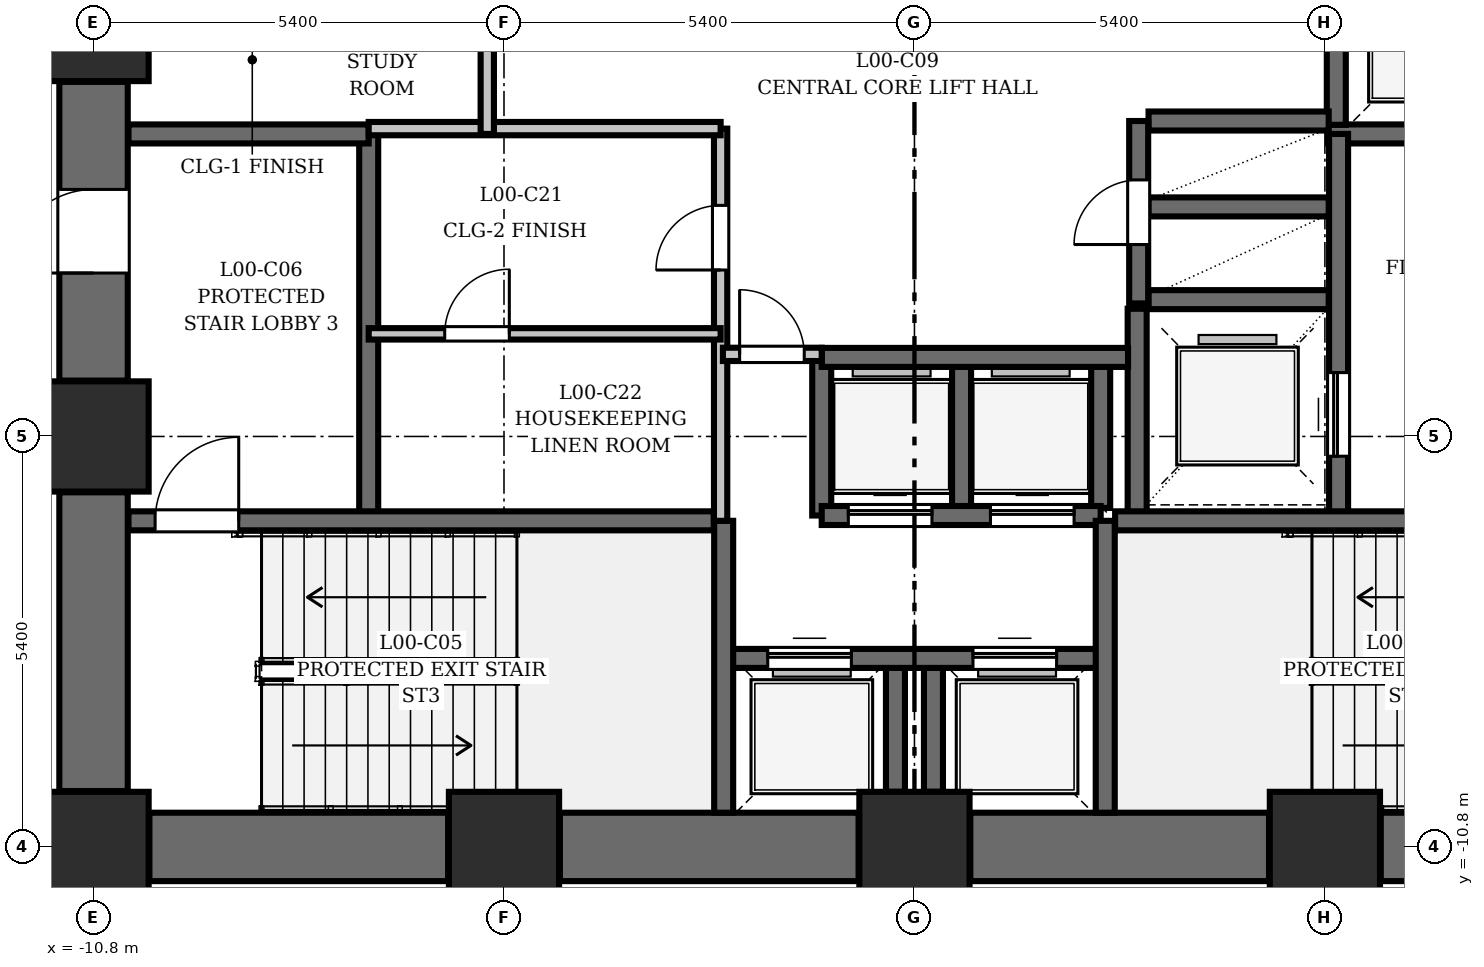
"""IFC4 building model, lengths in metres.
Left out: names, types, materials, properties, quantities, classifications, styles, units other than length and angle.
Written with IfcOpenShell. Run it as: python <this file> out.ifc"""

import sys

from ifc_helpers import new_model, si_unit, direction, frame, frame_2d, origin, origin_2d, place, context, subcontext, project, spatial, rectangle, extrude, element, fill, save


model = new_model("IFC4")
c1 = context("Model", 3, precision=1e-05, world=origin(), true_north=direction((0.0, 1.0)))
c2 = subcontext(c1, "Body", "Model", "MODEL_VIEW")
j1 = project(units=[si_unit("LENGTHUNIT", "METRE"), si_unit("PLANEANGLEUNIT", "RADIAN")], contexts=[c1])
p1 = place(None, origin())
s1 = spatial("IfcSite", under=j1, at=p1, CompositionType="ELEMENT")
p2 = place(p1, origin())
s2 = spatial("IfcBuilding", under=s1, at=p2, CompositionType="ELEMENT")
p3 = place(p2, origin())
s3 = spatial("IfcBuildingStorey", under=s2, at=p3, CompositionType="ELEMENT", Elevation=0.0)
for number, where, z_axis, x_axis in (
    (1, (-10.8, -10.8, 0.0), (0.0, 0.0, 1.0), (1.0, 0.0, 0.0)),
    (2, (-10.8, -5.4, 0.0), (0.0, 0.0, 1.0), (1.0, 0.0, 0.0)),
    (3, (-10.8, 0.0, 0.0), (0.0, 0.0, 1.0), (1.0, 0.0, 0.0)),
    (4, (-5.4, -10.8, 0.0), (0.0, 0.0, 1.0), (1.0, 0.0, 0.0)),
    (5, (0.0, -10.8, 0.0), (0.0, 0.0, 1.0), (1.0, 0.0, 0.0)),
    (6, (5.4, -10.8, 0.0), (0.0, 0.0, 1.0), (1.0, 0.0, 0.0)),
):
    element("IfcColumn", number, at=place(p3, frame(where, z_axis=z_axis, x_axis=x_axis)), inside=s3, PredefinedType="COLUMN", context=c2, shape_type="SweptSolid", body=[
        extrude(rectangle(XDim=1.45, YDim=1.45, at=origin_2d()), origin(), (0.0, 0.0, 1.0), 4.5),
    ])
for number, where, z_axis, x_axis in (
    (7, (-10.065, -10.8, 0.0), (0.0, 0.0, 1.0), (1.0, 0.0, 0.0)),
    (8, (-10.8, -10.065, 0.0), (0.0, 0.0, 1.0), (0.0, 1.0, 0.0)),
    (9, (-4.665, -10.8, 0.0), (0.0, 0.0, 1.0), (1.0, 0.0, 0.0)),
):
    element("IfcWall", number, at=place(p3, frame(where, z_axis=z_axis, x_axis=x_axis)), inside=s3, PredefinedType="SHEAR", context=c2, shape_type="SweptSolid", body=[
        extrude(rectangle(XDim=3.93, YDim=0.9, at=frame_2d((1.965, 0.0))), origin(), (0.0, 0.0, 1.0), 4.5),
    ])
p4 = place(p3, frame((-10.8, -4.665, 0.0), z_axis=(0.0, 0.0, 1.0), x_axis=(0.0, 1.0, 0.0)))
e10 = element("IfcWall", 10, at=p4, inside=s3, PredefinedType="SHEAR", context=c2, shape_type="SweptSolid", body=[
    extrude(rectangle(XDim=3.93, YDim=0.9, at=frame_2d((1.965, 0.0))), origin(), (0.0, 0.0, 1.0), 4.5),
])
p5 = place(p4, frame((1.415, 0.0, 0.0)))
e11 = element("IfcOpeningElement", 11, at=p5, cuts=e10, PredefinedType="OPENING", context=c2, shape_type="SweptSolid", body=[
    extrude(rectangle(XDim=1.1, YDim=2.1, at=frame_2d((0.55, 1.05))), frame((0.0, 0.46, 0.0), z_axis=(0.0, -1.0, 0.0), x_axis=(1.0, 0.0, 0.0)), (0.0, 0.0, 1.0), 0.92),
])
for number, where, z_axis, x_axis in (
    (12, (0.735, -10.8, 0.0), (0.0, 0.0, 1.0), (1.0, 0.0, 0.0)),
    (13, (6.135, -10.8, 0.0), (0.0, 0.0, 1.0), (1.0, 0.0, 0.0)),
):
    element("IfcWall", number, at=place(p3, frame(where, z_axis=z_axis, x_axis=x_axis)), inside=s3, PredefinedType="SHEAR", context=c2, shape_type="SweptSolid", body=[
        extrude(rectangle(XDim=3.93, YDim=0.9, at=frame_2d((1.965, 0.0))), origin(), (0.0, 0.0, 1.0), 4.5),
    ])
p6 = place(p3, frame((2.93, -6.51, 0.0), z_axis=(0.0, 0.0, 1.0), x_axis=(0.0, 1.0, 0.0)))
e14 = element("IfcWall", 14, at=p6, inside=s3, PredefinedType="SHEAR", context=c2, shape_type="SweptSolid", body=[
    extrude(rectangle(XDim=2.79, YDim=0.25, at=frame_2d((1.395, 0.0))), origin(), (0.0, 0.0, 1.0), 4.5),
])
p7 = place(p3, frame((5.44, -1.42, 0.0), z_axis=(0.0, 0.0, 1.0), x_axis=(1.0, 0.0, 0.0)))
e15 = element("IfcWall", 15, at=p7, inside=s3, PredefinedType="SHEAR", context=c2, shape_type="SweptSolid", body=[
    extrude(rectangle(XDim=4.9, YDim=0.25, at=frame_2d((2.45, 0.0))), origin(), (0.0, 0.0, 1.0), 4.5),
])
p8 = place(p3, frame((3.08, -3.6, 0.0), z_axis=(0.0, 0.0, 1.0), x_axis=(1.0, 0.0, 0.0)))
e16 = element("IfcWall", 16, at=p8, inside=s3, PredefinedType="SHEAR", context=c2, shape_type="SweptSolid", body=[
    extrude(rectangle(XDim=2.37, YDim=0.25, at=frame_2d((1.185, 0.0))), origin(), (0.0, 0.0, 1.0), 4.5),
])
p9 = place(p3, frame((5.58, -6.51, 0.0), z_axis=(0.0, 0.0, 1.0), x_axis=(0.0, 1.0, 0.0)))
e17 = element("IfcWall", 17, at=p9, inside=s3, PredefinedType="SHEAR", context=c2, shape_type="SweptSolid", body=[
    extrude(rectangle(XDim=5.09, YDim=0.25, at=frame_2d((2.545, 0.0))), origin(), (0.0, 0.0, 1.0), 4.5),
])
p10 = place(p9, frame((0.85, 0.0, 0.0)))
e18 = element("IfcOpeningElement", 18, at=p10, cuts=e17, PredefinedType="OPENING", context=c2, shape_type="SweptSolid", body=[
    extrude(rectangle(XDim=1.1, YDim=2.1, at=frame_2d((0.55, 1.05))), frame((0.0, 0.135, 0.0), z_axis=(0.0, -1.0, 0.0), x_axis=(1.0, 0.0, 0.0)), (0.0, 0.0, 1.0), 0.27),
])
for number, where, z_axis, x_axis in (
    (19, (0.62, -6.34, 0.0), (0.0, 0.0, 1.0), (0.0, 1.0, 0.0)),
    (20, (2.45, -6.34, 0.0), (0.0, 0.0, 1.0), (0.0, 1.0, 0.0)),
):
    element("IfcWall", number, at=place(p3, frame(where, z_axis=z_axis, x_axis=x_axis)), inside=s3, PredefinedType="SHEAR", context=c2, shape_type="SweptSolid", body=[
        extrude(rectangle(XDim=1.88, YDim=0.25, at=frame_2d((0.94, 0.0))), origin(), (0.0, 0.0, 1.0), 4.5),
    ])
for number, where, z_axis, x_axis in (
    (21, (-0.25, -10.075, 0.0), (0.0, 0.0, 1.0), (0.0, 1.0, 0.0)),
    (22, (0.25, -10.075, 0.0), (0.0, 0.0, 1.0), (0.0, 1.0, 0.0)),
):
    element("IfcWall", number, at=place(p3, frame(where, z_axis=z_axis, x_axis=x_axis)), inside=s3, PredefinedType="SHEAR", context=c2, shape_type="SweptSolid", body=[
        extrude(rectangle(XDim=1.635, YDim=0.25, at=frame_2d((0.817, 0.0))), origin(), (0.0, 0.0, 1.0), 4.5),
    ])
p11 = place(p3, frame((-1.22, -6.44, 0.0), z_axis=(0.0, 0.0, 1.0), x_axis=(0.0, 1.0, 0.0)))
e23 = element("IfcWall", 23, at=p11, inside=s3, PredefinedType="SHEAR", context=c2, shape_type="SweptSolid", body=[
    extrude(rectangle(XDim=2.08, YDim=0.25, at=frame_2d((1.04, 0.0))), origin(), (0.0, 0.0, 1.0), 4.5),
])
p12 = place(p3, frame((-1.22, -6.44, 0.0), z_axis=(0.0, 0.0, 1.0), x_axis=(1.0, 0.0, 0.0)))
e24 = element("IfcWall", 24, at=p12, inside=s3, PredefinedType="SHEAR", context=c2, shape_type="SweptSolid", body=[
    extrude(rectangle(XDim=3.67, YDim=0.25, at=frame_2d((1.835, 0.0))), origin(), (0.0, 0.0, 1.0), 4.5),
])
p13 = place(p12, frame((0.35, 0.0, 0.0)))
e25 = element("IfcOpeningElement", 25, at=p13, cuts=e24, PredefinedType="OPENING", context=c2, shape_type="SweptSolid", body=[
    extrude(rectangle(XDim=1.1, YDim=2.1, at=frame_2d((0.55, 1.05))), frame((0.0, 0.135, 0.0), z_axis=(0.0, -1.0, 0.0), x_axis=(1.0, 0.0, 0.0)), (0.0, 0.0, 1.0), 0.27),
])
p14 = place(p12, frame((2.22, 0.0, 0.0)))
e26 = element("IfcOpeningElement", 26, at=p14, cuts=e24, PredefinedType="OPENING", context=c2, shape_type="SweptSolid", body=[
    extrude(rectangle(XDim=1.1, YDim=2.1, at=frame_2d((0.55, 1.05))), frame((0.0, 0.135, 0.0), z_axis=(0.0, -1.0, 0.0), x_axis=(1.0, 0.0, 0.0)), (0.0, 0.0, 1.0), 0.27),
])
p15 = place(p3, frame((-2.48, -8.32, 0.0), z_axis=(0.0, 0.0, 1.0), x_axis=(1.0, 0.0, 0.0)))
e27 = element("IfcWall", 27, at=p15, inside=s3, PredefinedType="SHEAR", context=c2, shape_type="SweptSolid", body=[
    extrude(rectangle(XDim=4.93, YDim=0.25, at=frame_2d((2.465, 0.0))), origin(), (0.0, 0.0, 1.0), 4.5),
])
p16 = place(p15, frame((0.55, 0.0, 0.0)))
e28 = element("IfcOpeningElement", 28, at=p16, cuts=e27, PredefinedType="OPENING", context=c2, shape_type="SweptSolid", body=[
    extrude(rectangle(XDim=1.1, YDim=2.1, at=frame_2d((0.55, 1.05))), frame((0.0, 0.135, 0.0), z_axis=(0.0, -1.0, 0.0), x_axis=(1.0, 0.0, 0.0)), (0.0, 0.0, 1.0), 0.27),
])
p17 = place(p15, frame((3.25, 0.0, 0.0)))
e29 = element("IfcOpeningElement", 29, at=p17, cuts=e27, PredefinedType="OPENING", context=c2, shape_type="SweptSolid", body=[
    extrude(rectangle(XDim=1.1, YDim=2.1, at=frame_2d((0.55, 1.05))), frame((0.0, 0.135, 0.0), z_axis=(0.0, -1.0, 0.0), x_axis=(1.0, 0.0, 0.0)), (0.0, 0.0, 1.0), 0.27),
])
p18 = place(p3, frame((-1.22, -4.36, 0.0), z_axis=(0.0, 0.0, 1.0), x_axis=(1.0, 0.0, 0.0)))
e30 = element("IfcWall", 30, at=p18, inside=s3, PredefinedType="SHEAR", context=c2, shape_type="SweptSolid", body=[
    extrude(rectangle(XDim=4.03, YDim=0.25, at=frame_2d((2.015, 0.0))), origin(), (0.0, 0.0, 1.0), 4.5),
])
p19 = place(p3, frame((5.55, -1.3, 0.0), z_axis=(0.0, 0.0, 1.0), x_axis=(0.0, 1.0, 0.0)))
e31 = element("IfcWall", 31, at=p19, inside=s3, PredefinedType="SHEAR", context=c2, shape_type="SweptSolid", body=[
    extrude(rectangle(XDim=2.04, YDim=0.25, at=frame_2d((1.02, 0.0))), origin(), (0.0, 0.0, 1.0), 4.5),
])
for number, where, z_axis, x_axis in (
    (32, (3.08, -2.38, 0.0), (0.0, 0.0, 1.0), (1.0, 0.0, 0.0)),
    (33, (3.08, -1.25, 0.0), (0.0, 0.0, 1.0), (1.0, 0.0, 0.0)),
):
    element("IfcWall", number, at=place(p3, frame(where, z_axis=z_axis, x_axis=x_axis)), inside=s3, PredefinedType="SHEAR", context=c2, shape_type="SweptSolid", body=[
        extrude(rectangle(XDim=2.37, YDim=0.25, at=frame_2d((1.185, 0.0))), origin(), (0.0, 0.0, 1.0), 4.5),
    ])
p20 = place(p3, frame((2.95, -3.65, 0.0), z_axis=(0.0, 0.0, 1.0), x_axis=(0.0, 1.0, 0.0)))
e34 = element("IfcWall", 34, at=p20, inside=s3, PredefinedType="SHEAR", context=c2, shape_type="SweptSolid", body=[
    extrude(rectangle(XDim=2.4, YDim=0.25, at=frame_2d((1.2, 0.0))), origin(), (0.0, 0.0, 1.0), 4.5),
])
p21 = place(p20, frame((0.775, 0.0, 0.0)))
e35 = element("IfcOpeningElement", 35, at=p21, cuts=e34, PredefinedType="OPENING", context=c2, shape_type="SweptSolid", body=[
    extrude(rectangle(XDim=0.85, YDim=2.1, at=frame_2d((0.425, 1.05))), frame((0.0, 0.135, 0.0), z_axis=(0.0, -1.0, 0.0), x_axis=(1.0, 0.0, 0.0)), (0.0, 0.0, 1.0), 0.27),
])
p22 = place(p3, frame((2.64, -6.51, 0.0), z_axis=(0.0, 0.0, 1.0), x_axis=(1.0, 0.0, 0.0)))
e36 = element("IfcWall", 36, at=p22, inside=s3, PredefinedType="SHEAR", context=c2, shape_type="SweptSolid", body=[
    extrude(rectangle(XDim=7.7, YDim=0.25, at=frame_2d((3.85, 0.0))), origin(), (0.0, 0.0, 1.0), 4.5),
])
p23 = place(p22, frame((6.0, 0.0, 0.0)))
e37 = element("IfcOpeningElement", 37, at=p23, cuts=e36, PredefinedType="OPENING", context=c2, shape_type="SweptSolid", body=[
    extrude(rectangle(XDim=0.95, YDim=2.1, at=frame_2d((0.475, 1.05))), frame((0.0, 0.135, 0.0), z_axis=(0.0, -1.0, 0.0), x_axis=(1.0, 0.0, 0.0)), (0.0, 0.0, 1.0), 0.27),
])
for number, where, z_axis, x_axis in (
    (38, (2.51, -10.35, 0.0), (0.0, 0.0, 1.0), (0.0, 1.0, 0.0)),
    (39, (-2.51, -10.35, 0.0), (0.0, 0.0, 1.0), (0.0, 1.0, 0.0)),
):
    element("IfcWall", number, at=place(p3, frame(where, z_axis=z_axis, x_axis=x_axis)), inside=s3, PredefinedType="SHEAR", context=c2, shape_type="SweptSolid", body=[
        extrude(rectangle(XDim=3.84, YDim=0.25, at=frame_2d((1.92, 0.0))), origin(), (0.0, 0.0, 1.0), 4.5),
    ])
p24 = place(p3, frame((-7.18, -6.51, 0.0), z_axis=(0.0, 0.0, 1.0), x_axis=(0.0, 1.0, 0.0)))
e40 = element("IfcWall", 40, at=p24, inside=s3, PredefinedType="SHEAR", context=c2, shape_type="SweptSolid", body=[
    extrude(rectangle(XDim=5.09, YDim=0.25, at=frame_2d((2.545, 0.0))), origin(), (0.0, 0.0, 1.0), 4.5),
])
p25 = place(p3, frame((-10.34, -1.42, 0.0), z_axis=(0.0, 0.0, 1.0), x_axis=(1.0, 0.0, 0.0)))
e41 = element("IfcWall", 41, at=p25, inside=s3, PredefinedType="SHEAR", context=c2, shape_type="SweptSolid", body=[
    extrude(rectangle(XDim=3.16, YDim=0.25, at=frame_2d((1.58, 0.0))), origin(), (0.0, 0.0, 1.0), 4.5),
])
p26 = place(p3, frame((-10.34, -6.51, 0.0), z_axis=(0.0, 0.0, 1.0), x_axis=(1.0, 0.0, 0.0)))
e42 = element("IfcWall", 42, at=p26, inside=s3, PredefinedType="SHEAR", context=c2, shape_type="SweptSolid", body=[
    extrude(rectangle(XDim=7.7, YDim=0.25, at=frame_2d((3.85, 0.0))), origin(), (0.0, 0.0, 1.0), 4.5),
])
p27 = place(p26, frame((0.35, 0.0, 0.0)))
e43 = element("IfcOpeningElement", 43, at=p27, cuts=e42, PredefinedType="OPENING", context=c2, shape_type="SweptSolid", body=[
    extrude(rectangle(XDim=1.1, YDim=2.1, at=frame_2d((0.55, 1.05))), frame((0.0, 0.135, 0.0), z_axis=(0.0, -1.0, 0.0), x_axis=(1.0, 0.0, 0.0)), (0.0, 0.0, 1.0), 0.27),
])
p28 = place(p3, frame((-2.55, -6.51, 0.0), z_axis=(0.0, 0.0, 1.0), x_axis=(0.0, 1.0, 0.0)))
e44 = element("IfcWall", 44, at=p28, inside=s3, PredefinedType="PARTITIONING", context=c2, shape_type="SweptSolid", body=[
    extrude(rectangle(XDim=5.16, YDim=0.175, at=frame_2d((2.58, 0.0))), origin(), (0.0, 0.0, 1.0), 4.2),
])
p29 = place(p28, frame((3.3, 0.0, 0.0)))
e45 = element("IfcOpeningElement", 45, at=p29, cuts=e44, PredefinedType="OPENING", context=c2, shape_type="SweptSolid", body=[
    extrude(rectangle(XDim=0.85, YDim=2.1, at=frame_2d((0.425, 1.05))), frame((0.0, 0.097, 0.0), z_axis=(0.0, -1.0, 0.0), x_axis=(1.0, 0.0, 0.0)), (0.0, 0.0, 1.0), 0.195),
])
p30 = place(p3, frame((-7.18, -4.05, 0.0), z_axis=(0.0, 0.0, 1.0), x_axis=(1.0, 0.0, 0.0)))
e46 = element("IfcWall", 46, at=p30, inside=s3, PredefinedType="PARTITIONING", context=c2, shape_type="SweptSolid", body=[
    extrude(rectangle(XDim=4.63, YDim=0.15, at=frame_2d((2.315, 0.0))), origin(), (0.0, 0.0, 1.0), 4.2),
])
p31 = place(p30, frame((1.0, 0.0, 0.0)))
e47 = element("IfcOpeningElement", 47, at=p31, cuts=e46, PredefinedType="OPENING", context=c2, shape_type="SweptSolid", body=[
    extrude(rectangle(XDim=0.85, YDim=2.1, at=frame_2d((0.425, 1.05))), frame((0.0, 0.085, 0.0), z_axis=(0.0, -1.0, 0.0), x_axis=(1.0, 0.0, 0.0)), (0.0, 0.0, 1.0), 0.17),
])
p32 = place(p3, frame((-7.18, -1.35, 0.0), z_axis=(0.0, 0.0, 1.0), x_axis=(1.0, 0.0, 0.0)))
e48 = element("IfcWall", 48, at=p32, inside=s3, PredefinedType="PARTITIONING", context=c2, shape_type="SweptSolid", body=[
    extrude(rectangle(XDim=4.63, YDim=0.175, at=frame_2d((2.315, 0.0))), origin(), (0.0, 0.0, 1.0), 4.2),
])
p33 = place(p3, frame((-5.62, -1.42, 0.0), z_axis=(0.0, 0.0, 1.0), x_axis=(0.0, 1.0, 0.0)))
e49 = element("IfcWall", 49, at=p33, inside=s3, PredefinedType="PARTITIONING", context=c2, shape_type="SweptSolid", body=[
    extrude(rectangle(XDim=2.14, YDim=0.175, at=frame_2d((1.07, 0.0))), origin(), (0.0, 0.0, 1.0), 4.2),
])
p34 = place(p3, frame((-2.52, -4.32, 0.0), z_axis=(0.0, 0.0, 1.0), x_axis=(1.0, 0.0, 0.0)))
e50 = element("IfcWall", 50, at=p34, inside=s3, PredefinedType="PARTITIONING", context=c2, shape_type="SweptSolid", body=[
    extrude(rectangle(XDim=1.3, YDim=0.175, at=frame_2d((0.65, 0.0))), origin(), (0.0, 0.0, 1.0), 4.2),
])
p35 = place(p34, frame((0.22, 0.0, 0.0)))
e51 = element("IfcOpeningElement", 51, at=p35, cuts=e50, PredefinedType="OPENING", context=c2, shape_type="SweptSolid", body=[
    extrude(rectangle(XDim=0.85, YDim=2.1, at=frame_2d((0.425, 1.05))), frame((0.0, 0.097, 0.0), z_axis=(0.0, -1.0, 0.0), x_axis=(1.0, 0.0, 0.0)), (0.0, 0.0, 1.0), 0.195),
])
p36 = place(p3, frame((-21.56, -5.9, 0.0), z_axis=(0.0, 0.0, 1.0), x_axis=(1.0, 0.0, 0.0)))
e52 = element("IfcWall", 52, at=p36, inside=s3, PredefinedType="PARTITIONING", context=c2, shape_type="SweptSolid", body=[
    extrude(rectangle(XDim=10.71, YDim=0.2, at=frame_2d((5.355, 0.0))), origin(), (0.0, 0.0, 1.0), 3.329),
])
p37 = place(p36, frame((7.36, 0.0, 0.0)))
e53 = element("IfcOpeningElement", 53, at=p37, cuts=e52, PredefinedType="OPENING", context=c2, shape_type="SweptSolid", body=[
    extrude(rectangle(XDim=1.1, YDim=2.1, at=frame_2d((0.55, 1.05))), frame((0.0, 0.11, 0.0), z_axis=(0.0, -1.0, 0.0), x_axis=(1.0, 0.0, 0.0)), (0.0, 0.0, 1.0), 0.22),
])
p38 = place(p27, origin())
e54 = element("IfcDoor", 54, at=p38, inside=s3, OperationType="SINGLE_SWING_RIGHT", PredefinedType="DOOR", context=c2, shape_type="SweptSolid", body=[
    extrude(rectangle(XDim=1.1, YDim=2.1, at=frame_2d((0.55, 1.05))), frame((0.0, 0.025, 0.0), z_axis=(0.0, -1.0, 0.0), x_axis=(1.0, 0.0, 0.0)), (0.0, 0.0, 1.0), 0.05),
])
fill(e43, e54)
p39 = place(p21, origin())
e55 = element("IfcDoor", 55, at=p39, inside=s3, OperationType="SINGLE_SWING_LEFT", PredefinedType="DOOR", context=c2, shape_type="SweptSolid", body=[
    extrude(rectangle(XDim=0.85, YDim=2.1, at=frame_2d((0.425, 1.05))), frame((0.0, 0.025, 0.0), z_axis=(0.0, -1.0, 0.0), x_axis=(1.0, 0.0, 0.0)), (0.0, 0.0, 1.0), 0.05),
])
fill(e35, e55)
p40 = place(p5, origin())
e56 = element("IfcDoor", 56, at=p40, inside=s3, OperationType="SINGLE_SWING_LEFT", PredefinedType="DOOR", context=c2, shape_type="SweptSolid", body=[
    extrude(rectangle(XDim=1.1, YDim=2.1, at=frame_2d((0.55, 1.05))), frame((0.0, 0.025, 0.0), z_axis=(0.0, -1.0, 0.0), x_axis=(1.0, 0.0, 0.0)), (0.0, 0.0, 1.0), 0.05),
])
fill(e11, e56)
p41 = place(p10, origin())
e57 = element("IfcDoor", 57, at=p41, inside=s3, OperationType="SLIDING_TO_RIGHT", PredefinedType="DOOR", context=c2, shape_type="SweptSolid", body=[
    extrude(rectangle(XDim=1.1, YDim=2.1, at=frame_2d((0.55, 1.05))), frame((0.0, 0.025, 0.0), z_axis=(0.0, -1.0, 0.0), x_axis=(1.0, 0.0, 0.0)), (0.0, 0.0, 1.0), 0.05),
])
fill(e18, e57)
p42 = place(p35, origin())
e58 = element("IfcDoor", 58, at=p42, inside=s3, OperationType="SINGLE_SWING_LEFT", PredefinedType="DOOR", context=c2, shape_type="SweptSolid", body=[
    extrude(rectangle(XDim=0.85, YDim=2.1, at=frame_2d((0.425, 1.05))), frame((0.0, 0.025, 0.0), z_axis=(0.0, -1.0, 0.0), x_axis=(1.0, 0.0, 0.0)), (0.0, 0.0, 1.0), 0.05),
])
fill(e51, e58)
p43 = place(p13, origin())
e59 = element("IfcDoor", 59, at=p43, inside=s3, OperationType="SLIDING_TO_LEFT", PredefinedType="DOOR", context=c2, shape_type="SweptSolid", body=[
    extrude(rectangle(XDim=1.1, YDim=2.1, at=frame_2d((0.55, 1.05))), frame((0.0, 0.025, 0.0), z_axis=(0.0, -1.0, 0.0), x_axis=(1.0, 0.0, 0.0)), (0.0, 0.0, 1.0), 0.05),
])
fill(e25, e59)
p44 = place(p14, origin())
e60 = element("IfcDoor", 60, at=p44, inside=s3, OperationType="SLIDING_TO_LEFT", PredefinedType="DOOR", context=c2, shape_type="SweptSolid", body=[
    extrude(rectangle(XDim=1.1, YDim=2.1, at=frame_2d((0.55, 1.05))), frame((0.0, 0.025, 0.0), z_axis=(0.0, -1.0, 0.0), x_axis=(1.0, 0.0, 0.0)), (0.0, 0.0, 1.0), 0.05),
])
fill(e26, e60)
p45 = place(p16, origin())
e61 = element("IfcDoor", 61, at=p45, inside=s3, OperationType="SLIDING_TO_LEFT", PredefinedType="DOOR", context=c2, shape_type="SweptSolid", body=[
    extrude(rectangle(XDim=1.1, YDim=2.1, at=frame_2d((0.55, 1.05))), frame((0.0, 0.025, 0.0), z_axis=(0.0, -1.0, 0.0), x_axis=(1.0, 0.0, 0.0)), (0.0, 0.0, 1.0), 0.05),
])
fill(e28, e61)
p46 = place(p17, origin())
e62 = element("IfcDoor", 62, at=p46, inside=s3, OperationType="SLIDING_TO_LEFT", PredefinedType="DOOR", context=c2, shape_type="SweptSolid", body=[
    extrude(rectangle(XDim=1.1, YDim=2.1, at=frame_2d((0.55, 1.05))), frame((0.0, 0.025, 0.0), z_axis=(0.0, -1.0, 0.0), x_axis=(1.0, 0.0, 0.0)), (0.0, 0.0, 1.0), 0.05),
])
fill(e29, e62)
p47 = place(p29, origin())
e63 = element("IfcDoor", 63, at=p47, inside=s3, OperationType="SINGLE_SWING_LEFT", PredefinedType="DOOR", context=c2, shape_type="SweptSolid", body=[
    extrude(rectangle(XDim=0.85, YDim=2.1, at=frame_2d((0.425, 1.05))), frame((0.0, 0.025, 0.0), z_axis=(0.0, -1.0, 0.0), x_axis=(1.0, 0.0, 0.0)), (0.0, 0.0, 1.0), 0.05),
])
fill(e45, e63)
p48 = place(p31, origin())
e64 = element("IfcDoor", 64, at=p48, inside=s3, OperationType="SINGLE_SWING_RIGHT", PredefinedType="DOOR", context=c2, shape_type="SweptSolid", body=[
    extrude(rectangle(XDim=0.85, YDim=2.1, at=frame_2d((0.425, 1.05))), frame((0.0, 0.025, 0.0), z_axis=(0.0, -1.0, 0.0), x_axis=(1.0, 0.0, 0.0)), (0.0, 0.0, 1.0), 0.05),
])
fill(e47, e64)
save(model, sys.argv[1])
